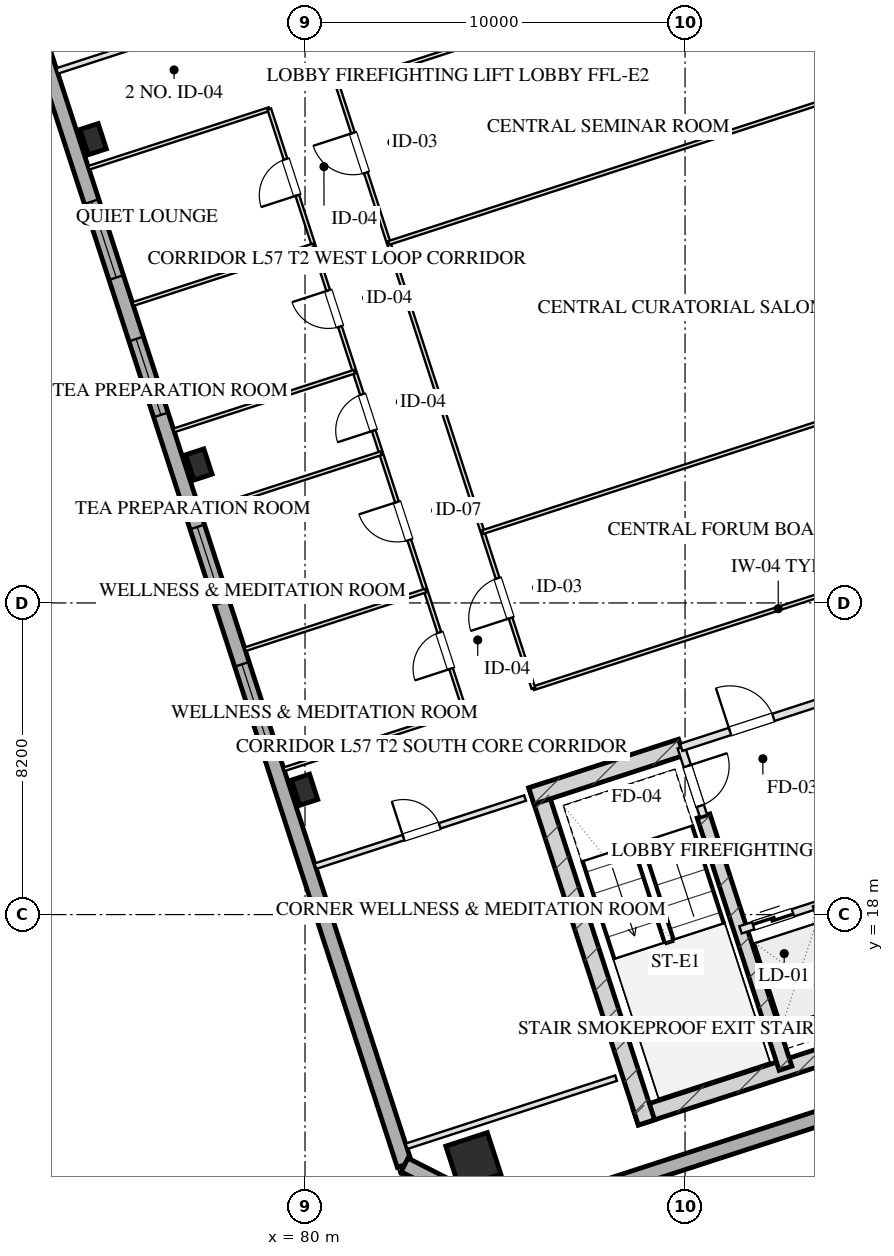
"""IFC4 building model, lengths in metres.
Left out: names, types, materials, properties, quantities, classifications, styles, units other than length and angle.
Written with IfcOpenShell. Run it as: python <this file> out.ifc"""

import sys

from ifc_helpers import new_model, si_unit, direction, frame, frame_2d, origin, origin_2d, place, context, subcontext, project, spatial, rectangle, hollow_rectangle, extrude, element, fill, save


model = new_model("IFC4")
c1 = context("Model", 3, precision=1e-05, world=origin(), true_north=direction((0.0, 1.0)))
c2 = subcontext(c1, "Body", "Model", "MODEL_VIEW")
j1 = project(units=[si_unit("LENGTHUNIT", "METRE"), si_unit("PLANEANGLEUNIT", "RADIAN")], contexts=[c1])
p1 = place(None, origin())
s1 = spatial("IfcSite", under=j1, at=p1, CompositionType="ELEMENT")
p2 = place(p1, origin())
s2 = spatial("IfcBuilding", under=s1, at=p2, CompositionType="ELEMENT")
p3 = place(p2, frame((0.0, 0.0, 212.75)))
s3 = spatial("IfcBuildingStorey", under=s2, at=p3, CompositionType="ELEMENT", Elevation=212.75)
p4 = place(p3, frame((88.701, 12.675, 0.0), z_axis=(0.0, 0.0, 1.0), x_axis=(0.95105824505, 0.309011673763, 0.0)))
e1 = element("IfcWall", 1, at=p4, inside=s3, PredefinedType="SHEAR", context=c2, shape_type="SweptSolid", body=[
    extrude(rectangle(XDim=16.25, YDim=0.45, at=frame_2d((8.125, 0.0))), origin(), (0.0, 0.0, 1.0), 3.45),
])
p5 = place(p3, frame((86.102, 21.404, 0.0), z_axis=(0.0, 0.0, 1.0), x_axis=(0.309035778627, -0.951050412717, 0.0)))
e2 = element("IfcWall", 2, at=p5, inside=s3, PredefinedType="SHEAR", context=c2, shape_type="SweptSolid", body=[
    extrude(rectangle(XDim=9.33, YDim=0.45, at=frame_2d((4.665, 0.0))), origin(), (0.0, 0.0, 1.0), 3.45),
])
p6 = place(p3, frame((90.486, 20.594, 0.0), z_axis=(0.0, 0.0, 1.0), x_axis=(0.309020428229, -0.951055400562, 0.0)))
e3 = element("IfcWall", 3, at=p6, inside=s3, PredefinedType="SHEAR", context=c2, shape_type="SweptSolid", body=[
    extrude(rectangle(XDim=6.98, YDim=0.35, at=frame_2d((3.49, 0.0))), origin(), (0.0, 0.0, 1.0), 3.45),
])
p7 = place(p3, frame((85.957, 21.12, 0.0), z_axis=(0.0, 0.0, 1.0), x_axis=(0.951064796122, 0.308991510526, 0.0)))
e4 = element("IfcWall", 4, at=p7, inside=s3, PredefinedType="SHEAR", context=c2, shape_type="SweptSolid", body=[
    extrude(rectangle(XDim=4.145, YDim=0.45, at=frame_2d((2.073, 0.0))), origin(), (0.0, 0.0, 1.0), 3.45),
])
p8 = place(p3, frame((84.428, 11.539, 0.0), z_axis=(0.0, 0.0, 1.0), x_axis=(0.951056516295, 0.309016994375, 0.0)))
e5 = element("IfcColumn", 5, at=p8, inside=s3, PredefinedType="COLUMN", context=c2, shape_type="SweptSolid", body=[
    extrude(hollow_rectangle(XDim=1.15, YDim=1.15, WallThickness=0.04, at=origin_2d()), origin(), (0.0, 0.0, 1.0), 3.451),
])
for number, where, z_axis, x_axis in (
    (6, (79.99, 21.284, 0.0), (0.0, 0.0, 1.0), (0.951, 0.309, 0.0)),
    (7, (77.208, 29.844, 0.0), (0.0, 0.0, 1.0), (0.951, 0.309, 0.0)),
    (8, (74.427, 38.403, 0.0), (0.0, 0.0, 1.0), (0.951, 0.309, 0.0)),
):
    element("IfcColumn", number, at=place(p3, frame(where, z_axis=z_axis, x_axis=x_axis)), inside=s3, PredefinedType="COLUMN", context=c2, shape_type="SweptSolid", body=[
        extrude(hollow_rectangle(XDim=0.5, YDim=0.7, WallThickness=0.025, at=origin_2d()), origin(), (0.0, 0.0, 1.0), 3.451),
    ])
p9 = place(p3, frame((82.618, 11.414, 0.0), z_axis=(0.0, 0.0, 1.0), x_axis=(-0.309016491071, 0.951056679828, 0.0)))
e9 = element("IfcWall", 9, at=p9, inside=s3, PredefinedType="SOLIDWALL", context=c2, shape_type="SweptSolid", body=[
    extrude(rectangle(XDim=38.4, YDim=0.4, at=frame_2d((19.2, 0.0))), origin(), (0.0, 0.0, 1.0), 2.55),
])
p10 = place(p9, frame((11.75, 0.0, 0.75)))
e10 = element("IfcOpeningElement", 10, at=p10, cuts=e9, PredefinedType="OPENING", context=c2, shape_type="SweptSolid", body=[
    extrude(rectangle(XDim=2.1, YDim=1.4, at=frame_2d((1.05, 0.7))), frame((0.0, 0.21, 0.0), z_axis=(0.0, -1.0, 0.0), x_axis=(1.0, 0.0, 0.0)), (0.0, 0.0, 1.0), 0.42),
])
p11 = place(p9, frame((15.55, 0.0, 0.75)))
e11 = element("IfcOpeningElement", 11, at=p11, cuts=e9, PredefinedType="OPENING", context=c2, shape_type="SweptSolid", body=[
    extrude(rectangle(XDim=2.1, YDim=1.4, at=frame_2d((1.05, 0.7))), frame((0.0, 0.21, 0.0), z_axis=(0.0, -1.0, 0.0), x_axis=(1.0, 0.0, 0.0)), (0.0, 0.0, 1.0), 0.42),
])
p12 = place(p9, frame((20.75, 0.0, 0.75)))
e12 = element("IfcOpeningElement", 12, at=p12, cuts=e9, PredefinedType="OPENING", context=c2, shape_type="SweptSolid", body=[
    extrude(rectangle(XDim=2.1, YDim=1.4, at=frame_2d((1.05, 0.7))), frame((0.0, 0.21, 0.0), z_axis=(0.0, -1.0, 0.0), x_axis=(1.0, 0.0, 0.0)), (0.0, 0.0, 1.0), 0.42),
])
p13 = place(p9, frame((24.55, 0.0, 0.75)))
e13 = element("IfcOpeningElement", 13, at=p13, cuts=e9, PredefinedType="OPENING", context=c2, shape_type="SweptSolid", body=[
    extrude(rectangle(XDim=2.1, YDim=1.4, at=frame_2d((1.05, 0.7))), frame((0.0, 0.21, 0.0), z_axis=(0.0, -1.0, 0.0), x_axis=(1.0, 0.0, 0.0)), (0.0, 0.0, 1.0), 0.42),
])
p14 = place(p3, frame((107.835, 17.294, 0.0), z_axis=(0.0, 0.0, 1.0), x_axis=(-0.951058012937, -0.309012388148, 0.0)))
e14 = element("IfcWall", 14, at=p14, inside=s3, PredefinedType="SOLIDWALL", context=c2, shape_type="SweptSolid", body=[
    extrude(rectangle(XDim=23.6, YDim=0.4, at=frame_2d((11.8, 0.0))), origin(), (0.0, 0.0, 1.0), 2.55),
])
p15 = place(p3, frame((85.39, 10.001, 0.0), z_axis=(0.0, 0.0, 1.0), x_axis=(-0.890979603174, 0.454043331334, 0.0)))
e15 = element("IfcWall", 15, at=p15, inside=s3, PredefinedType="SOLIDWALL", context=c2, shape_type="SweptSolid", body=[
    extrude(rectangle(XDim=3.111, YDim=0.4, at=frame_2d((1.556, 0.0))), origin(), (0.0, 0.0, 1.0), 2.55),
])
p16 = place(p3, frame((89.899, 22.401, 0.0), z_axis=(0.0, 0.0, 1.0), x_axis=(0.308932062672, -0.951084108086, 0.0)))
e16 = element("IfcWall", 16, at=p16, inside=s3, PredefinedType="PARTITIONING", context=c2, shape_type="SweptSolid", body=[
    extrude(rectangle(XDim=1.9, YDim=0.2, at=frame_2d((0.95, 0.0))), origin(), (0.0, 0.0, 1.0), 3.155),
])
p17 = place(p16, frame((0.52, 0.0, 0.0)))
e17 = element("IfcOpeningElement", 17, at=p17, cuts=e16, PredefinedType="OPENING", context=c2, shape_type="SweptSolid", body=[
    extrude(rectangle(XDim=1.1, YDim=2.05, at=frame_2d((0.55, 1.025))), frame((0.0, 0.11, 0.0), z_axis=(0.0, -1.0, 0.0), x_axis=(1.0, 0.0, 0.0)), (0.0, 0.0, 1.0), 0.22),
])
p18 = place(p3, frame((89.899, 22.401, 0.0), z_axis=(0.0, 0.0, 1.0), x_axis=(0.951046716504, 0.309047153403, 0.0)))
e18 = element("IfcWall", 18, at=p18, inside=s3, PredefinedType="PARTITIONING", context=c2, shape_type="SweptSolid", body=[
    extrude(rectangle(XDim=3.83, YDim=0.2, at=frame_2d((1.915, 0.0))), origin(), (0.0, 0.0, 1.0), 3.155),
])
p19 = place(p18, frame((1.35, 0.0, 0.0)))
e19 = element("IfcOpeningElement", 19, at=p19, cuts=e18, PredefinedType="OPENING", context=c2, shape_type="SweptSolid", body=[
    extrude(rectangle(XDim=1.2, YDim=2.05, at=frame_2d((0.6, 1.025))), frame((0.0, 0.11, 0.0), z_axis=(0.0, -1.0, 0.0), x_axis=(1.0, 0.0, 0.0)), (0.0, 0.0, 1.0), 0.22),
])
p20 = place(p3, frame((91.46, 17.598, 0.0), z_axis=(0.0, 0.0, 1.0), x_axis=(0.951062257173, 0.308999325213, 0.0)))
e20 = element("IfcWall", 20, at=p20, inside=s3, PredefinedType="PARTITIONING", context=c2, shape_type="SweptSolid", body=[
    extrude(rectangle(XDim=2.1, YDim=0.2, at=frame_2d((1.05, 0.0))), origin(), (0.0, 0.0, 1.0), 3.155),
])
p21 = place(p20, frame((0.35, 0.0, 0.0)))
e21 = element("IfcOpeningElement", 21, at=p21, cuts=e20, PredefinedType="OPENING", context=c2, shape_type="SweptSolid", body=[
    extrude(rectangle(XDim=1.1, YDim=2.05, at=frame_2d((0.55, 1.025))), frame((0.0, 0.11, 0.0), z_axis=(0.0, -1.0, 0.0), x_axis=(1.0, 0.0, 0.0)), (0.0, 0.0, 1.0), 0.22),
])
p22 = place(p3, frame((93.457, 18.247, 0.0), z_axis=(0.0, 0.0, 1.0), x_axis=(0.3089935693, -0.951064127245, 0.0)))
e22 = element("IfcWall", 22, at=p22, inside=s3, PredefinedType="PARTITIONING", context=c2, shape_type="SweptSolid", body=[
    extrude(rectangle(XDim=3.7, YDim=0.2, at=frame_2d((1.85, 0.0))), origin(), (0.0, 0.0, 1.0), 3.155),
])
p23 = place(p3, frame((82.669, 11.903, 0.0), z_axis=(0.0, 0.0, 1.0), x_axis=(0.951059431056, 0.309008023519, 0.0)))
e23 = element("IfcWall", 23, at=p23, inside=s3, PredefinedType="PARTITIONING", context=c2, shape_type="SweptSolid", body=[
    extrude(rectangle(XDim=5.8, YDim=0.15, at=frame_2d((2.9, 0.0))), origin(), (0.0, 0.0, 1.0), 3.155),
])
p24 = place(p3, frame((80.275, 19.274, 0.0), z_axis=(0.0, 0.0, 1.0), x_axis=(0.951059431056, 0.309008023519, 0.0)))
e24 = element("IfcWall", 24, at=p24, inside=s3, PredefinedType="PARTITIONING", context=c2, shape_type="SweptSolid", body=[
    extrude(rectangle(XDim=5.8, YDim=0.15, at=frame_2d((2.9, 0.0))), origin(), (0.0, 0.0, 1.0), 2.15),
])
p25 = place(p24, frame((2.436, 0.0, 0.0)))
e25 = element("IfcOpeningElement", 25, at=p25, cuts=e24, PredefinedType="OPENING", context=c2, shape_type="SweptSolid", body=[
    extrude(rectangle(XDim=1.0, YDim=2.05, at=frame_2d((0.5, 1.025))), frame((0.0, 0.085, 0.0), z_axis=(0.0, -1.0, 0.0), x_axis=(1.0, 0.0, 0.0)), (0.0, 0.0, 1.0), 0.17),
])
p26 = place(p3, frame((73.476, 40.197, 0.0), z_axis=(0.0, 0.0, 1.0), x_axis=(0.951059431056, 0.309008023519, 0.0)))
e26 = element("IfcWall", 26, at=p26, inside=s3, PredefinedType="PARTITIONING", context=c2, shape_type="SweptSolid", body=[
    extrude(rectangle(XDim=5.8, YDim=0.15, at=frame_2d((2.9, 0.0))), origin(), (0.0, 0.0, 1.0), 2.15),
])
p27 = place(p26, frame((2.436, 0.0, 0.0)))
e27 = element("IfcOpeningElement", 27, at=p27, cuts=e26, PredefinedType="OPENING", context=c2, shape_type="SweptSolid", body=[
    extrude(rectangle(XDim=1.0, YDim=2.05, at=frame_2d((0.5, 1.025))), frame((0.0, 0.085, 0.0), z_axis=(0.0, -1.0, 0.0), x_axis=(1.0, 0.0, 0.0)), (0.0, 0.0, 1.0), 0.17),
])
p28 = place(p3, frame((79.447, 21.823, 0.0), z_axis=(0.0, 0.0, 1.0), x_axis=(0.951048779938, 0.309040803421, 0.0)))
e28 = element("IfcWall", 28, at=p28, inside=s3, PredefinedType="MOVABLE", context=c2, shape_type="SweptSolid", body=[
    extrude(rectangle(XDim=5.0, YDim=0.1, at=frame_2d((2.5, 0.0))), origin(), (0.0, 0.0, 1.0), 3.155),
])
p29 = place(p3, frame((86.009, 23.955, 0.0), z_axis=(0.0, 0.0, 1.0), x_axis=(0.951059488241, 0.309007847517, 0.0)))
e29 = element("IfcWall", 29, at=p29, inside=s3, PredefinedType="MOVABLE", context=c2, shape_type="SweptSolid", body=[
    extrude(rectangle(XDim=13.55, YDim=0.1, at=frame_2d((6.775, 0.0))), origin(), (0.0, 0.0, 1.0), 3.155),
])
p30 = place(p3, frame((74.304, 37.648, 0.0), z_axis=(0.0, 0.0, 1.0), x_axis=(0.951063130697, 0.308996636599, 0.0)))
e30 = element("IfcWall", 30, at=p30, inside=s3, PredefinedType="MOVABLE", context=c2, shape_type="SweptSolid", body=[
    extrude(rectangle(XDim=5.0, YDim=0.1, at=frame_2d((2.5, 0.0))), origin(), (0.0, 0.0, 1.0), 3.155),
])
p31 = place(p3, frame((80.867, 39.781, 0.0), z_axis=(0.0, 0.0, 1.0), x_axis=(0.951054192928, 0.309024144872, 0.0)))
e31 = element("IfcWall", 31, at=p31, inside=s3, PredefinedType="MOVABLE", context=c2, shape_type="SweptSolid", body=[
    extrude(rectangle(XDim=13.55, YDim=0.1, at=frame_2d((6.775, 0.0))), origin(), (0.0, 0.0, 1.0), 3.155),
])
p32 = place(p3, frame((84.202, 23.368, 0.0), z_axis=(0.0, 0.0, 1.0), x_axis=(-0.309022042254, 0.951054876125, 0.0)))
e32 = element("IfcWall", 32, at=p32, inside=s3, PredefinedType="MOVABLE", context=c2, shape_type="SweptSolid", body=[
    extrude(rectangle(XDim=16.64, YDim=0.1, at=frame_2d((8.32, 0.0))), origin(), (0.0, 0.0, 1.0), 3.155),
])
p33 = place(p32, frame((1.16, 0.0, 0.0)))
e33 = element("IfcOpeningElement", 33, at=p33, cuts=e32, PredefinedType="OPENING", context=c2, shape_type="SweptSolid", body=[
    extrude(rectangle(XDim=1.0, YDim=2.05, at=frame_2d((0.5, 1.025))), frame((0.0, 0.06, 0.0), z_axis=(0.0, -1.0, 0.0), x_axis=(1.0, 0.0, 0.0)), (0.0, 0.0, 1.0), 0.12),
])
p34 = place(p32, frame((4.72, 0.0, 0.0)))
e34 = element("IfcOpeningElement", 34, at=p34, cuts=e32, PredefinedType="OPENING", context=c2, shape_type="SweptSolid", body=[
    extrude(rectangle(XDim=1.05, YDim=2.05, at=frame_2d((0.525, 1.025))), frame((0.0, 0.06, 0.0), z_axis=(0.0, -1.0, 0.0), x_axis=(1.0, 0.0, 0.0)), (0.0, 0.0, 1.0), 0.12),
])
p35 = place(p32, frame((7.748, 0.0, 0.0)))
e35 = element("IfcOpeningElement", 35, at=p35, cuts=e32, PredefinedType="OPENING", context=c2, shape_type="SweptSolid", body=[
    extrude(rectangle(XDim=1.0, YDim=2.05, at=frame_2d((0.5, 1.025))), frame((0.0, 0.06, 0.0), z_axis=(0.0, -1.0, 0.0), x_axis=(1.0, 0.0, 0.0)), (0.0, 0.0, 1.0), 0.12),
])
p36 = place(p32, frame((10.623, 0.0, 0.0)))
e36 = element("IfcOpeningElement", 36, at=p36, cuts=e32, PredefinedType="OPENING", context=c2, shape_type="SweptSolid", body=[
    extrude(rectangle(XDim=1.0, YDim=2.05, at=frame_2d((0.5, 1.025))), frame((0.0, 0.06, 0.0), z_axis=(0.0, -1.0, 0.0), x_axis=(1.0, 0.0, 0.0)), (0.0, 0.0, 1.0), 0.12),
])
p37 = place(p32, frame((14.255, 0.0, 0.0)))
e37 = element("IfcOpeningElement", 37, at=p37, cuts=e32, PredefinedType="OPENING", context=c2, shape_type="SweptSolid", body=[
    extrude(rectangle(XDim=1.0, YDim=2.05, at=frame_2d((0.5, 1.025))), frame((0.0, 0.06, 0.0), z_axis=(0.0, -1.0, 0.0), x_axis=(1.0, 0.0, 0.0)), (0.0, 0.0, 1.0), 0.12),
])
p38 = place(p3, frame((86.009, 23.955, 0.0), z_axis=(0.0, 0.0, 1.0), x_axis=(-0.309022042254, 0.951054876125, 0.0)))
e38 = element("IfcWall", 38, at=p38, inside=s3, PredefinedType="MOVABLE", context=c2, shape_type="SweptSolid", body=[
    extrude(rectangle(XDim=16.64, YDim=0.1, at=frame_2d((8.32, 0.0))), origin(), (0.0, 0.0, 1.0), 3.155),
])
p39 = place(p38, frame((1.944, 0.0, 0.0)))
e39 = element("IfcOpeningElement", 39, at=p39, cuts=e38, PredefinedType="OPENING", context=c2, shape_type="SweptSolid", body=[
    extrude(rectangle(XDim=1.1, YDim=2.05, at=frame_2d((0.55, 1.025))), frame((0.0, 0.06, 0.0), z_axis=(0.0, -1.0, 0.0), x_axis=(1.0, 0.0, 0.0)), (0.0, 0.0, 1.0), 0.12),
])
p40 = place(p38, frame((14.264, 0.0, 0.0)))
e40 = element("IfcOpeningElement", 40, at=p40, cuts=e38, PredefinedType="OPENING", context=c2, shape_type="SweptSolid", body=[
    extrude(rectangle(XDim=1.1, YDim=2.05, at=frame_2d((0.55, 1.025))), frame((0.0, 0.06, 0.0), z_axis=(0.0, -1.0, 0.0), x_axis=(1.0, 0.0, 0.0)), (0.0, 0.0, 1.0), 0.12),
])
p41 = place(p3, frame((84.674, 28.063, 0.0), z_axis=(0.0, 0.0, 1.0), x_axis=(0.951054192928, 0.309024144872, 0.0)))
e41 = element("IfcWall", 41, at=p41, inside=s3, PredefinedType="MOVABLE", context=c2, shape_type="SweptSolid", body=[
    extrude(rectangle(XDim=13.55, YDim=0.1, at=frame_2d((6.775, 0.0))), origin(), (0.0, 0.0, 1.0), 3.155),
])
p42 = place(p3, frame((82.202, 35.672, 0.0), z_axis=(0.0, 0.0, 1.0), x_axis=(0.951059488241, 0.309007847517, 0.0)))
e42 = element("IfcWall", 42, at=p42, inside=s3, PredefinedType="MOVABLE", context=c2, shape_type="SweptSolid", body=[
    extrude(rectangle(XDim=13.55, YDim=0.1, at=frame_2d((6.775, 0.0))), origin(), (0.0, 0.0, 1.0), 3.155),
])
p43 = place(p3, frame((78.42, 24.98, 0.0), z_axis=(0.0, 0.0, 1.0), x_axis=(0.951053443117, 0.309026452484, 0.0)))
e43 = element("IfcWall", 43, at=p43, inside=s3, PredefinedType="MOVABLE", context=c2, shape_type="SweptSolid", body=[
    extrude(rectangle(XDim=5.0, YDim=0.1, at=frame_2d((2.5, 0.0))), origin(), (0.0, 0.0, 1.0), 3.155),
])
for number, where, z_axis, x_axis in (
    (44, (77.246, 28.594, 0.0), (0.0, 0.0, 1.0), (0.951, 0.309, 0.0)),
    (45, (76.549, 30.74, 0.0), (0.0, 0.0, 1.0), (0.951, 0.309, 0.0)),
):
    element("IfcWall", number, at=place(p3, frame(where, z_axis=z_axis, x_axis=x_axis)), inside=s3, PredefinedType="MOVABLE", context=c2, shape_type="SweptSolid", body=[
        extrude(rectangle(XDim=5.0, YDim=0.1, at=frame_2d((2.5, 0.0))), origin(), (0.0, 0.0, 1.0), 3.155),
    ])
p44 = place(p3, frame((75.469, 34.063, 0.0), z_axis=(0.0, 0.0, 1.0), x_axis=(0.951053443117, 0.309026452484, 0.0)))
e46 = element("IfcWall", 46, at=p44, inside=s3, PredefinedType="MOVABLE", context=c2, shape_type="SweptSolid", body=[
    extrude(rectangle(XDim=5.0, YDim=0.1, at=frame_2d((2.5, 0.0))), origin(), (0.0, 0.0, 1.0), 3.155),
])
p45 = place(p10, origin())
e47 = element("IfcWindow", 47, at=p45, inside=s3, PartitioningType="TRIPLE_PANEL_VERTICAL", PredefinedType="WINDOW", context=c2, shape_type="SweptSolid", body=[
    extrude(rectangle(XDim=2.1, YDim=1.4, at=frame_2d((1.05, 0.7))), frame((0.0, 0.03, 0.0), z_axis=(0.0, -1.0, 0.0), x_axis=(1.0, 0.0, 0.0)), (0.0, 0.0, 1.0), 0.06),
])
fill(e10, e47)
p46 = place(p11, origin())
e48 = element("IfcWindow", 48, at=p46, inside=s3, PartitioningType="TRIPLE_PANEL_VERTICAL", PredefinedType="WINDOW", context=c2, shape_type="SweptSolid", body=[
    extrude(rectangle(XDim=2.1, YDim=1.4, at=frame_2d((1.05, 0.7))), frame((0.0, 0.03, 0.0), z_axis=(0.0, -1.0, 0.0), x_axis=(1.0, 0.0, 0.0)), (0.0, 0.0, 1.0), 0.06),
])
fill(e11, e48)
p47 = place(p12, origin())
e49 = element("IfcWindow", 49, at=p47, inside=s3, PartitioningType="TRIPLE_PANEL_VERTICAL", PredefinedType="WINDOW", context=c2, shape_type="SweptSolid", body=[
    extrude(rectangle(XDim=2.1, YDim=1.4, at=frame_2d((1.05, 0.7))), frame((0.0, 0.03, 0.0), z_axis=(0.0, -1.0, 0.0), x_axis=(1.0, 0.0, 0.0)), (0.0, 0.0, 1.0), 0.06),
])
fill(e12, e49)
p48 = place(p13, origin())
e50 = element("IfcWindow", 50, at=p48, inside=s3, PartitioningType="TRIPLE_PANEL_VERTICAL", PredefinedType="WINDOW", context=c2, shape_type="SweptSolid", body=[
    extrude(rectangle(XDim=2.1, YDim=1.4, at=frame_2d((1.05, 0.7))), frame((0.0, 0.03, 0.0), z_axis=(0.0, -1.0, 0.0), x_axis=(1.0, 0.0, 0.0)), (0.0, 0.0, 1.0), 0.06),
])
fill(e13, e50)
p49 = place(p17, origin())
e51 = element("IfcDoor", 51, at=p49, inside=s3, OperationType="SINGLE_SWING_LEFT", PredefinedType="DOOR", context=c2, shape_type="SweptSolid", body=[
    extrude(rectangle(XDim=1.1, YDim=2.05, at=frame_2d((0.55, 1.025))), frame((0.0, 0.025, 0.0), z_axis=(0.0, -1.0, 0.0), x_axis=(1.0, 0.0, 0.0)), (0.0, 0.0, 1.0), 0.05),
])
fill(e17, e51)
p50 = place(p19, origin())
e52 = element("IfcDoor", 52, at=p50, inside=s3, OperationType="SINGLE_SWING_LEFT", PredefinedType="DOOR", context=c2, shape_type="SweptSolid", body=[
    extrude(rectangle(XDim=1.2, YDim=2.05, at=frame_2d((0.6, 1.025))), frame((0.0, 0.025, 0.0), z_axis=(0.0, -1.0, 0.0), x_axis=(1.0, 0.0, 0.0)), (0.0, 0.0, 1.0), 0.05),
])
fill(e19, e52)
p51 = place(p21, origin())
e53 = element("IfcDoor", 53, at=p51, inside=s3, OperationType="DOUBLE_DOOR_SLIDING", PredefinedType="DOOR", context=c2, shape_type="SweptSolid", body=[
    extrude(rectangle(XDim=1.1, YDim=2.05, at=frame_2d((0.55, 1.025))), frame((0.0, 0.025, 0.0), z_axis=(0.0, -1.0, 0.0), x_axis=(1.0, 0.0, 0.0)), (0.0, 0.0, 1.0), 0.05),
])
fill(e21, e53)
p52 = place(p25, origin())
e54 = element("IfcDoor", 54, at=p52, inside=s3, OperationType="SINGLE_SWING_LEFT", PredefinedType="DOOR", context=c2, shape_type="SweptSolid", body=[
    extrude(rectangle(XDim=1.0, YDim=2.05, at=frame_2d((0.5, 1.025))), frame((0.0, 0.025, 0.0), z_axis=(0.0, -1.0, 0.0), x_axis=(1.0, 0.0, 0.0)), (0.0, 0.0, 1.0), 0.05),
])
fill(e25, e54)
p53 = place(p33, origin())
e55 = element("IfcDoor", 55, at=p53, inside=s3, OperationType="SINGLE_SWING_LEFT", PredefinedType="DOOR", context=c2, shape_type="SweptSolid", body=[
    extrude(rectangle(XDim=1.0, YDim=2.05, at=frame_2d((0.5, 1.025))), frame((0.0, 0.025, 0.0), z_axis=(0.0, -1.0, 0.0), x_axis=(1.0, 0.0, 0.0)), (0.0, 0.0, 1.0), 0.05),
])
fill(e33, e55)
p54 = place(p34, origin())
e56 = element("IfcDoor", 56, at=p54, inside=s3, OperationType="SINGLE_SWING_RIGHT", PredefinedType="DOOR", context=c2, shape_type="SweptSolid", body=[
    extrude(rectangle(XDim=1.05, YDim=2.05, at=frame_2d((0.525, 1.025))), frame((0.0, 0.025, 0.0), z_axis=(0.0, -1.0, 0.0), x_axis=(1.0, 0.0, 0.0)), (0.0, 0.0, 1.0), 0.05),
])
fill(e34, e56)
p55 = place(p35, origin())
e57 = element("IfcDoor", 57, at=p55, inside=s3, OperationType="SINGLE_SWING_LEFT", PredefinedType="DOOR", context=c2, shape_type="SweptSolid", body=[
    extrude(rectangle(XDim=1.0, YDim=2.05, at=frame_2d((0.5, 1.025))), frame((0.0, 0.025, 0.0), z_axis=(0.0, -1.0, 0.0), x_axis=(1.0, 0.0, 0.0)), (0.0, 0.0, 1.0), 0.05),
])
fill(e35, e57)
p56 = place(p36, origin())
e58 = element("IfcDoor", 58, at=p56, inside=s3, OperationType="SINGLE_SWING_RIGHT", PredefinedType="DOOR", context=c2, shape_type="SweptSolid", body=[
    extrude(rectangle(XDim=1.0, YDim=2.05, at=frame_2d((0.5, 1.025))), frame((0.0, 0.025, 0.0), z_axis=(0.0, -1.0, 0.0), x_axis=(1.0, 0.0, 0.0)), (0.0, 0.0, 1.0), 0.05),
])
fill(e36, e58)
p57 = place(p37, origin())
e59 = element("IfcDoor", 59, at=p57, inside=s3, OperationType="SINGLE_SWING_LEFT", PredefinedType="DOOR", context=c2, shape_type="SweptSolid", body=[
    extrude(rectangle(XDim=1.0, YDim=2.05, at=frame_2d((0.5, 1.025))), frame((0.0, 0.025, 0.0), z_axis=(0.0, -1.0, 0.0), x_axis=(1.0, 0.0, 0.0)), (0.0, 0.0, 1.0), 0.05),
])
fill(e37, e59)
p58 = place(p39, origin())
e60 = element("IfcDoor", 60, at=p58, inside=s3, OperationType="SINGLE_SWING_LEFT", PredefinedType="DOOR", context=c2, shape_type="SweptSolid", body=[
    extrude(rectangle(XDim=1.1, YDim=2.05, at=frame_2d((0.55, 1.025))), frame((0.0, 0.025, 0.0), z_axis=(0.0, -1.0, 0.0), x_axis=(1.0, 0.0, 0.0)), (0.0, 0.0, 1.0), 0.05),
])
fill(e39, e60)
p59 = place(p40, origin())
e61 = element("IfcDoor", 61, at=p59, inside=s3, OperationType="SINGLE_SWING_RIGHT", PredefinedType="DOOR", context=c2, shape_type="SweptSolid", body=[
    extrude(rectangle(XDim=1.1, YDim=2.05, at=frame_2d((0.55, 1.025))), frame((0.0, 0.025, 0.0), z_axis=(0.0, -1.0, 0.0), x_axis=(1.0, 0.0, 0.0)), (0.0, 0.0, 1.0), 0.05),
])
fill(e40, e61)
save(model, sys.argv[1])
